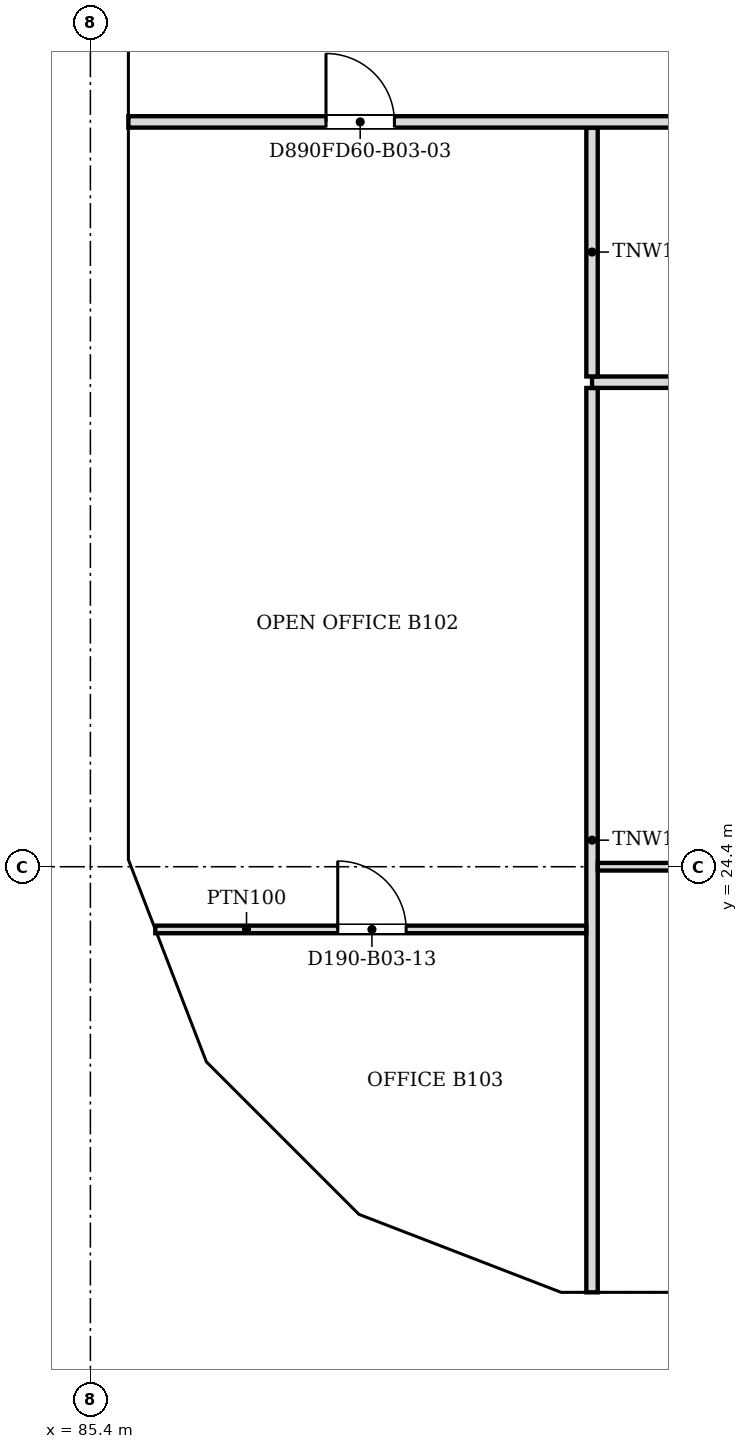
"""IFC4 building model, lengths in metres.
Left out: names, types, materials, properties, quantities, classifications, styles, units other than length and angle.
Written with IfcOpenShell. Run it as: python <this file> out.ifc"""

import sys

from ifc_helpers import new_model, si_unit, direction, frame, frame_2d, origin, place, context, subcontext, project, spatial, polyline, rectangle, outline, extrude, faceted_brep, source, transform, mapped, element, fill, save


model = new_model("IFC4")
c1 = context("Model", 3, precision=1e-05, world=origin(), true_north=direction((0.0, 1.0)))
c2 = subcontext(c1, "Body", "Model", "MODEL_VIEW")
j1 = project(units=[si_unit("LENGTHUNIT", "METRE"), si_unit("PLANEANGLEUNIT", "RADIAN")], contexts=[c1])
p1 = place(None, origin())
s1 = spatial("IfcSite", under=j1, at=p1, CompositionType="ELEMENT")
p2 = place(p1, origin())
s2 = spatial("IfcBuilding", under=s1, at=p2, CompositionType="ELEMENT")
p3 = place(p2, frame((0.0, 0.0, 25.8)))
s3 = spatial("IfcBuildingStorey", under=s2, at=p3, CompositionType="ELEMENT", Elevation=25.8)
m1 = source(origin(), c2, "Body", "Brep", [
    faceted_brep([(3.05, -0.25, 0.0), (0.047, -0.25, 3.8), (0.0, -0.25, 3.74), (0.0, -0.25, 0.0), (0.093, 0.25, 3.741), (3.05, 0.25, 0.0), (0.093, 0.25, 0.0), (0.047, 0.0, 3.8)], [[[0, 1, 2, 3]], [[4, 5, 6]], [[5, 4, 7, 1, 0]], [[2, 1, 7]], [[6, 5, 0, 3]], [[6, 3, 2, 7, 4]]]),
])
p4 = place(p3, frame((91.5, 18.55, 0.0), z_axis=(0.0, 0.0, 1.0), x_axis=(1.0, 0.0, 0.0)))
e1 = element("IfcWall", 1, at=p4, inside=s3, PredefinedType="SOLIDWALL", context=c2, shape_type="MappedRepresentation", body=[
    mapped(m1, transform((0.0, 0.0, 0.0), scale=1.0)),
])
m2 = source(origin(), c2, "Body", "SweptSolid", [
    extrude(outline(polyline([(2.534, 0.25), (0.247, 3.144), (0.247, 0.25), (2.534, 0.25)])), frame((0.0, 0.26, 0.0), z_axis=(0.0, -1.0, 0.0), x_axis=(1.0, 0.0, 0.0)), (0.0, 0.0, 1.0), 0.52),
])
p5 = place(p4, origin())
e2 = element("IfcOpeningElement", 2, at=p5, cuts=e1, PredefinedType="OPENING", context=c2, shape_type="MappedRepresentation", body=[
    mapped(m2, transform((0.0, 0.0, 0.0), scale=1.0)),
])
m3 = source(origin(), c2, "Body", "Brep", [
    faceted_brep([(2.997, -0.25, 3.741), (2.95, -0.25, 3.8), (0.0, -0.25, 0.0), (2.997, -0.25, 0.0), (0.053, 0.25, 0.068), (2.904, 0.25, 3.74), (2.904, 0.25, 0.0), (0.053, 0.25, 0.0), (2.95, 0.0, 3.8), (0.0, 0.0, 0.0)], [[[0, 1, 2, 3]], [[4, 5, 6, 7]], [[8, 1, 0]], [[5, 4, 9, 2, 1, 8]], [[7, 6, 3, 2, 9]], [[7, 9, 4]], [[3, 6, 5, 8, 0]]]),
])
p6 = place(p3, frame((88.794, 19.612, 0.0), z_axis=(0.0, 0.0, 1.0), x_axis=(0.933000876937, -0.359874094142, 0.0)))
e3 = element("IfcWall", 3, at=p6, inside=s3, PredefinedType="SOLIDWALL", context=c2, shape_type="MappedRepresentation", body=[
    mapped(m3, transform((0.0, 0.0, 0.0), scale=1.0)),
])
m4 = source(origin(), c2, "Body", "SweptSolid", [
    extrude(outline(polyline([(2.75, 3.135), (0.511, 0.25), (2.75, 0.25), (2.75, 3.135)])), frame((0.0, 0.26, 0.0), z_axis=(0.0, -1.0, 0.0), x_axis=(1.0, 0.0, 0.0)), (0.0, 0.0, 1.0), 0.52),
])
p7 = place(p6, origin())
e4 = element("IfcOpeningElement", 4, at=p7, cuts=e3, PredefinedType="OPENING", context=c2, shape_type="MappedRepresentation", body=[
    mapped(m4, transform((0.0, 0.0, 0.0), scale=1.0)),
])
m5 = source(origin(), c2, "Body", "SweptSolid", [
    extrude(outline(polyline([(6.1, 0.0), (3.05, 3.8), (0.0, 0.0), (6.1, 0.0)])), frame((0.0, 0.25, 0.0), z_axis=(0.0, -1.0, 0.0), x_axis=(1.0, 0.0, 0.0)), (0.0, 0.0, 1.0), 0.5),
])
p8 = place(p3, frame((85.65, 36.6, 0.0), z_axis=(0.0, 0.0, 1.0), x_axis=(0.0, -1.0, 0.0)))
e5 = element("IfcWall", 5, at=p8, inside=s3, PredefinedType="SOLIDWALL", context=c2, shape_type="MappedRepresentation", body=[
    mapped(m5, transform((0.0, 0.0, 0.0), scale=1.0)),
])
m6 = source(origin(), c2, "Body", "SweptSolid", [
    extrude(outline(polyline([(5.579, 0.25), (3.05, 3.401), (0.521, 0.25), (5.579, 0.25)])), frame((0.0, 0.26, 0.0), z_axis=(0.0, -1.0, 0.0), x_axis=(1.0, 0.0, 0.0)), (0.0, 0.0, 1.0), 0.52),
])
p9 = place(p8, origin())
e6 = element("IfcOpeningElement", 6, at=p9, cuts=e5, PredefinedType="OPENING", context=c2, shape_type="MappedRepresentation", body=[
    mapped(m6, transform((0.0, 0.0, 0.0), scale=1.0)),
])
m7 = source(origin(), c2, "Body", "Brep", [
    faceted_brep([(6.053, -0.25, 0.0), (3.05, -0.25, 3.8), (0.0, -0.25, 0.0), (0.0, 0.25, 0.0), (3.05, 0.25, 3.8), (6.007, 0.25, 0.059), (6.007, 0.25, 0.0), (6.053, 0.0, 0.0)], [[[0, 1, 2]], [[3, 4, 5, 6]], [[5, 4, 1, 0, 7]], [[4, 3, 2, 1]], [[3, 6, 7, 0, 2]], [[7, 6, 5]]]),
])
p10 = place(p3, frame((85.65, 30.5, 0.0), z_axis=(0.0, 0.0, 1.0), x_axis=(0.0, -1.0, 0.0)))
e7 = element("IfcWall", 7, at=p10, inside=s3, PredefinedType="SOLIDWALL", context=c2, shape_type="MappedRepresentation", body=[
    mapped(m7, transform((0.0, 0.0, 0.0), scale=1.0)),
])
m8 = source(origin(), c2, "Body", "SweptSolid", [
    extrude(outline(polyline([(5.537, 0.25), (3.049, 3.399), (0.521, 0.25), (5.537, 0.25)])), frame((0.0, 0.26, 0.0), z_axis=(0.0, -1.0, 0.0), x_axis=(1.0, 0.0, 0.0)), (0.0, 0.0, 1.0), 0.52),
])
p11 = place(p10, origin())
e8 = element("IfcOpeningElement", 8, at=p11, cuts=e7, PredefinedType="OPENING", context=c2, shape_type="MappedRepresentation", body=[
    mapped(m8, transform((0.0, 0.0, 0.0), scale=1.0)),
])
m9 = source(origin(), c2, "Body", "Brep", [
    faceted_brep([(3.003, -0.25, 3.732), (2.95, -0.25, 3.8), (0.0, -0.25, 0.0), (3.003, -0.25, 0.0), (0.047, 0.25, 0.06), (2.898, 0.25, 3.732), (2.898, 0.25, 0.0), (0.047, 0.25, 0.0), (2.95, 0.0, 3.8), (0.0, 0.0, 0.0)], [[[0, 1, 2, 3]], [[4, 5, 6, 7]], [[8, 1, 0]], [[5, 4, 9, 2, 1, 8]], [[7, 6, 3, 2, 9]], [[7, 9, 4]], [[3, 6, 5, 8, 0]]]),
])
p12 = place(p3, frame((85.65, 24.447, 0.0), z_axis=(0.0, 0.0, 1.0), x_axis=(0.35992665181, -0.932980602862, 0.0)))
e9 = element("IfcWall", 9, at=p12, inside=s3, PredefinedType="SOLIDWALL", context=c2, shape_type="MappedRepresentation", body=[
    mapped(m9, transform((0.0, 0.0, 0.0), scale=1.0)),
])
p13 = place(p12, origin())
e10 = element("IfcOpeningElement", 10, at=p13, cuts=e9, PredefinedType="OPENING", context=c2, shape_type="MappedRepresentation", body=[
    mapped(m4, transform((0.0, 0.0, 0.0), scale=1.0)),
])
m10 = source(origin(), c2, "Body", "Brep", [
    faceted_brep([(2.997, -0.25, 0.0), (0.053, -0.25, 3.8), (0.0, -0.25, 3.732), (0.0, -0.25, 0.0), (0.106, 0.25, 3.732), (2.944, 0.25, 0.068), (2.944, 0.25, 0.0), (0.106, 0.25, 0.0), (0.053, 0.0, 3.8), (2.997, 0.0, 0.0)], [[[0, 1, 2, 3]], [[4, 5, 6, 7]], [[5, 4, 8, 1, 0, 9]], [[2, 1, 8]], [[7, 6, 9, 0, 3]], [[7, 3, 2, 8, 4]], [[9, 6, 5]]]),
])
p14 = place(p3, frame((86.675, 21.731, 0.0), z_axis=(0.0, 0.0, 1.0), x_axis=(0.707106781187, -0.707106781187, 0.0)))
e11 = element("IfcWall", 11, at=p14, inside=s3, PredefinedType="SOLIDWALL", context=c2, shape_type="MappedRepresentation", body=[
    mapped(m10, transform((0.0, 0.0, 0.0), scale=1.0)),
])
m11 = source(origin(), c2, "Body", "SweptSolid", [
    extrude(outline(polyline([(2.487, 0.25), (0.253, 3.134), (0.253, 0.25), (2.487, 0.25)])), frame((0.0, 0.26, 0.0), z_axis=(0.0, -1.0, 0.0), x_axis=(1.0, 0.0, 0.0)), (0.0, 0.0, 1.0), 0.52),
])
p15 = place(p14, origin())
e12 = element("IfcOpeningElement", 12, at=p15, cuts=e11, PredefinedType="OPENING", context=c2, shape_type="MappedRepresentation", body=[
    mapped(m11, transform((0.0, 0.0, 0.0), scale=1.0)),
])
p16 = place(p2, frame((0.0, 0.0, 29.6)))
s4 = spatial("IfcBuildingStorey", under=s2, at=p16, CompositionType="ELEMENT", Elevation=29.6)
m12 = source(origin(), c2, "Body", "Brep", [
    faceted_brep([(3.003, -0.25, 0.0), (6.053, -0.25, 3.8), (3.003, -0.25, 7.6), (0.0, -0.25, 3.8), (0.047, 0.25, 3.859), (3.003, 0.25, 7.6), (6.053, 0.25, 3.8), (3.003, 0.25, 0.0), (0.047, 0.25, 3.741), (0.0, 0.0, 3.8)], [[[0, 1, 2, 3]], [[4, 5, 6, 7, 8]], [[7, 6, 1, 0]], [[6, 5, 2, 1]], [[5, 4, 9, 3, 2]], [[8, 7, 0, 3, 9]], [[8, 9, 4]]]),
])
p17 = place(p16, frame((91.547, 18.55, -3.8), z_axis=(0.0, 0.0, 1.0), x_axis=(1.0, 0.0, 0.0)))
e13 = element("IfcWall", 13, at=p17, inside=s4, PredefinedType="SOLIDWALL", context=c2, shape_type="MappedRepresentation", body=[
    mapped(m12, transform((0.0, 0.0, 0.0), scale=1.0)),
])
m13 = source(origin(), c2, "Body", "SweptSolid", [
    extrude(outline(polyline([(3.005, 0.401), (5.733, 3.8), (3.005, 7.199), (0.319, 3.8), (3.005, 0.401)])), frame((0.0, 0.26, 0.0), z_axis=(0.0, -1.0, 0.0), x_axis=(1.0, 0.0, 0.0)), (0.0, 0.0, 1.0), 0.52),
])
p18 = place(p17, origin())
e14 = element("IfcOpeningElement", 14, at=p18, cuts=e13, PredefinedType="OPENING", context=c2, shape_type="MappedRepresentation", body=[
    mapped(m13, transform((0.0, 0.0, 0.0), scale=1.0)),
])
m14 = source(origin(), c2, "Body", "Brep", [
    faceted_brep([(3.05, -0.25, 0.0), (6.1, -0.25, 3.8), (6.1, -0.25, 3.8), (3.05, -0.25, 7.6), (0.0, -0.25, 3.8), (0.0, 0.25, 3.8), (3.05, 0.25, 7.6), (6.1, 0.25, 3.8), (6.1, 0.25, 3.8), (3.05, 0.25, 0.0)], [[[0, 1, 2, 3, 4]], [[5, 6, 7, 8, 9]], [[9, 8, 1, 0]], [[7, 6, 3, 2]], [[6, 5, 4, 3]], [[5, 9, 0, 4]], [[1, 8, 7, 2]]]),
])
p19 = place(p16, frame((85.65, 39.65, -3.8), z_axis=(0.0, 0.0, 1.0), x_axis=(0.0, -1.0, 0.0)))
e15 = element("IfcWall", 15, at=p19, inside=s4, PredefinedType="SOLIDWALL", context=c2, shape_type="MappedRepresentation", body=[
    mapped(m14, transform((0.0, 0.0, 0.0), scale=1.0)),
])
m15 = source(origin(), c2, "Body", "SweptSolid", [
    extrude(outline(polyline([(3.05, 0.399), (5.78, 3.8), (3.05, 7.2), (0.321, 3.8), (3.05, 0.399)])), frame((0.0, 0.26, 0.0), z_axis=(0.0, -1.0, 0.0), x_axis=(1.0, 0.0, 0.0)), (0.0, 0.0, 1.0), 0.52),
])
p20 = place(p19, origin())
e16 = element("IfcOpeningElement", 16, at=p20, cuts=e15, PredefinedType="OPENING", context=c2, shape_type="MappedRepresentation", body=[
    mapped(m15, transform((0.0, 0.0, 0.0), scale=1.0)),
])
m16 = source(origin(), c2, "Body", "SweptSolid", [
    extrude(outline(polyline([(3.05, 0.0), (6.1, 3.8), (3.05, 7.6), (0.0, 3.8), (3.05, 0.0)])), frame((0.0, 0.25, 0.0), z_axis=(0.0, -1.0, 0.0), x_axis=(1.0, 0.0, 0.0)), (0.0, 0.0, 1.0), 0.5),
])
p21 = place(p16, frame((85.65, 33.55, -3.8), z_axis=(0.0, 0.0, 1.0), x_axis=(0.0, -1.0, 0.0)))
e17 = element("IfcWall", 17, at=p21, inside=s4, PredefinedType="SOLIDWALL", context=c2, shape_type="MappedRepresentation", body=[
    mapped(m16, transform((0.0, 0.0, 0.0), scale=1.0)),
])
p22 = place(p21, origin())
e18 = element("IfcOpeningElement", 18, at=p22, cuts=e17, PredefinedType="OPENING", context=c2, shape_type="MappedRepresentation", body=[
    mapped(m15, transform((0.0, 0.0, 0.0), scale=1.0)),
])
m17 = source(origin(), c2, "Body", "Brep", [
    faceted_brep([(3.003, -0.25, 0.0), (3.05, -0.25, 0.06), (3.05, -0.25, 7.54), (3.003, -0.25, 7.6), (0.0, -0.25, 3.8), (0.0, 0.25, 3.8), (2.957, 0.25, 7.541), (2.957, 0.25, 0.059), (3.003, 0.0, 0.0), (3.003, 0.0, 7.6)], [[[0, 1, 2, 3, 4]], [[5, 6, 7]], [[1, 0, 8]], [[9, 3, 2]], [[6, 5, 4, 3, 9]], [[5, 7, 8, 0, 4]], [[1, 8, 7, 6, 9, 2]]]),
])
p23 = place(p16, frame((85.65, 27.45, -3.8), z_axis=(0.0, 0.0, 1.0), x_axis=(0.0, -1.0, 0.0)))
e19 = element("IfcWall", 19, at=p23, inside=s4, PredefinedType="SOLIDWALL", context=c2, shape_type="MappedRepresentation", body=[
    mapped(m17, transform((0.0, 0.0, 0.0), scale=1.0)),
])
m18 = source(origin(), c2, "Body", "SweptSolid", [
    extrude(outline(polyline([(2.803, 6.944), (0.319, 3.8), (2.803, 0.656), (2.803, 6.944)])), frame((0.0, 0.26, 0.0), z_axis=(0.0, -1.0, 0.0), x_axis=(1.0, 0.0, 0.0)), (0.0, 0.0, 1.0), 0.52),
])
p24 = place(p23, origin())
e20 = element("IfcOpeningElement", 20, at=p24, cuts=e19, PredefinedType="OPENING", context=c2, shape_type="MappedRepresentation", body=[
    mapped(m18, transform((0.0, 0.0, 0.0), scale=1.0)),
])
m19 = source(origin(), c2, "Body", "Brep", [
    faceted_brep([(0.047, -0.25, 0.0), (2.997, -0.25, 3.8), (0.047, -0.25, 7.6), (0.0, -0.25, 7.541), (0.0, -0.25, 0.059), (0.093, 0.25, 7.54), (2.944, 0.25, 3.868), (2.944, 0.25, 3.732), (0.093, 0.25, 0.06), (2.997, 0.0, 3.8), (0.047, 0.0, 0.0), (0.047, 0.0, 7.6)], [[[0, 1, 2, 3, 4]], [[5, 6, 7, 8]], [[8, 7, 9, 1, 0, 10]], [[6, 5, 11, 2, 1, 9]], [[3, 2, 11]], [[10, 0, 4]], [[8, 10, 4, 3, 11, 5]], [[7, 6, 9]]]),
])
p25 = place(p16, frame((85.633, 24.49, -3.8), z_axis=(0.0, 0.0, 1.0), x_axis=(0.359901446078, -0.932990326376, 0.0)))
e21 = element("IfcWall", 21, at=p25, inside=s4, PredefinedType="SOLIDWALL", context=c2, shape_type="MappedRepresentation", body=[
    mapped(m19, transform((0.0, 0.0, 0.0), scale=1.0)),
])
m20 = source(origin(), c2, "Body", "SweptSolid", [
    extrude(outline(polyline([(0.247, 0.665), (2.681, 3.8), (0.247, 6.935), (0.247, 0.665)])), frame((0.0, 0.26, 0.0), z_axis=(0.0, -1.0, 0.0), x_axis=(1.0, 0.0, 0.0)), (0.0, 0.0, 1.0), 0.52),
])
p26 = place(p25, origin())
e22 = element("IfcOpeningElement", 22, at=p26, cuts=e21, PredefinedType="OPENING", context=c2, shape_type="MappedRepresentation", body=[
    mapped(m20, transform((0.0, 0.0, 0.0), scale=1.0)),
])
m21 = source(origin(), c2, "Body", "Brep", [
    faceted_brep([(2.944, -0.25, 0.0), (2.997, -0.25, 0.068), (2.997, -0.25, 7.532), (2.944, -0.25, 7.6), (0.0, -0.25, 3.8), (0.053, 0.25, 3.868), (2.891, 0.25, 7.532), (2.891, 0.25, 0.068), (0.053, 0.25, 3.732), (2.944, 0.0, 0.0), (2.944, 0.0, 7.6), (0.0, 0.0, 3.8)], [[[0, 1, 2, 3, 4]], [[5, 6, 7, 8]], [[1, 0, 9]], [[10, 3, 2]], [[6, 5, 11, 4, 3, 10]], [[8, 7, 9, 0, 4, 11]], [[8, 11, 5]], [[1, 9, 7, 6, 10, 2]]]),
])
p27 = place(p16, frame((86.712, 21.694, -3.8), z_axis=(0.0, 0.0, 1.0), x_axis=(0.707066050402, -0.707147509625, 0.0)))
e23 = element("IfcWall", 23, at=p27, inside=s4, PredefinedType="SOLIDWALL", context=c2, shape_type="MappedRepresentation", body=[
    mapped(m21, transform((0.0, 0.0, 0.0), scale=1.0)),
])
m22 = source(origin(), c2, "Body", "SweptSolid", [
    extrude(outline(polyline([(2.744, 6.934), (0.316, 3.8), (2.744, 0.666), (2.744, 6.934)])), frame((0.0, 0.26, 0.0), z_axis=(0.0, -1.0, 0.0), x_axis=(1.0, 0.0, 0.0)), (0.0, 0.0, 1.0), 0.52),
])
p28 = place(p27, origin())
e24 = element("IfcOpeningElement", 24, at=p28, cuts=e23, PredefinedType="OPENING", context=c2, shape_type="MappedRepresentation", body=[
    mapped(m22, transform((0.0, 0.0, 0.0), scale=1.0)),
])
m23 = source(origin(), c2, "Body", "Brep", [
    faceted_brep([(0.053, -0.25, 0.0), (3.003, -0.25, 3.8), (0.053, -0.25, 7.6), (0.0, -0.25, 7.531), (0.0, -0.25, 0.068), (0.106, 0.25, 7.532), (2.957, 0.25, 3.86), (2.957, 0.25, 3.74), (0.106, 0.25, 0.068), (3.003, 0.0, 3.8), (0.053, 0.0, 0.0), (0.053, 0.0, 7.6)], [[[0, 1, 2, 3, 4]], [[5, 6, 7, 8]], [[8, 7, 9, 1, 0, 10]], [[6, 5, 11, 2, 1, 9]], [[3, 2, 11]], [[10, 0, 4]], [[8, 10, 4, 3, 11, 5]], [[7, 6, 9]]]),
])
p29 = place(p16, frame((88.744, 19.631, -3.8), z_axis=(0.0, 0.0, 1.0), x_axis=(0.932997369089, -0.359883188373, 0.0)))
e25 = element("IfcWall", 25, at=p29, inside=s4, PredefinedType="SOLIDWALL", context=c2, shape_type="MappedRepresentation", body=[
    mapped(m23, transform((0.0, 0.0, 0.0), scale=1.0)),
])
m24 = source(origin(), c2, "Body", "SweptSolid", [
    extrude(outline(polyline([(0.253, 0.665), (2.687, 3.8), (0.253, 6.935), (0.253, 0.665)])), frame((0.0, 0.26, 0.0), z_axis=(0.0, -1.0, 0.0), x_axis=(1.0, 0.0, 0.0)), (0.0, 0.0, 1.0), 0.52),
])
p30 = place(p29, origin())
e26 = element("IfcOpeningElement", 26, at=p30, cuts=e25, PredefinedType="OPENING", context=c2, shape_type="MappedRepresentation", body=[
    mapped(m24, transform((0.0, 0.0, 0.0), scale=1.0)),
])
p31 = place(p3, frame((92.0, 18.8, 0.0), z_axis=(0.0, 0.0, 1.0), x_axis=(0.0, 1.0, 0.0)))
e27 = element("IfcWall", 27, at=p31, inside=s3, PredefinedType="PARTITIONING", context=c2, shape_type="SweptSolid", body=[
    extrude(rectangle(XDim=11.899, YDim=0.15, at=frame_2d((5.949, 0.0))), origin(), (0.0, 0.0, 1.0), 3.067),
])
p32 = place(p3, frame((91.924, 23.575, 0.0), z_axis=(0.0, 0.0, 1.0), x_axis=(-1.0, 0.0, 0.0)))
e28 = element("IfcWall", 28, at=p32, inside=s3, PredefinedType="PARTITIONING", context=c2, shape_type="SweptSolid", body=[
    extrude(rectangle(XDim=5.67, YDim=0.1, at=frame_2d((2.835, 0.0))), origin(), (0.0, 0.0, 1.0), 3.067),
])
m25 = source(origin(), c2, "Body", "SweptSolid", [
    extrude(rectangle(XDim=0.9, YDim=2.1, at=frame_2d((0.45, 1.05))), frame((0.0, 0.06, 0.0), z_axis=(0.0, -1.0, 0.0), x_axis=(1.0, 0.0, 0.0)), (0.0, 0.0, 1.0), 0.12),
])
p33 = place(p32, frame((2.37, 0.0, 0.0)))
e29 = element("IfcOpeningElement", 29, at=p33, cuts=e28, PredefinedType="OPENING", context=c2, shape_type="MappedRepresentation", body=[
    mapped(m25, transform((0.0, 0.0, 0.0), scale=1.0)),
])
p34 = place(p3, frame((97.149, 24.4, 0.0), z_axis=(0.0, 0.0, 1.0), x_axis=(-1.0, 0.0, 0.0)))
e30 = element("IfcWall", 30, at=p34, inside=s3, PredefinedType="PARTITIONING", context=c2, shape_type="SweptSolid", body=[
    extrude(rectangle(XDim=5.073, YDim=0.1, at=frame_2d((2.537, 0.0))), origin(), (0.0, 0.0, 1.0), 3.067),
])
p35 = place(p34, frame((2.073, 0.0, 0.0)))
e31 = element("IfcOpeningElement", 31, at=p35, cuts=e30, PredefinedType="OPENING", context=c2, shape_type="MappedRepresentation", body=[
    mapped(m25, transform((0.0, 0.0, 0.0), scale=1.0)),
])
p36 = place(p3, frame((104.2, 30.775, 0.0), z_axis=(0.0, 0.0, 1.0), x_axis=(-1.0, 0.0, 0.0)))
e32 = element("IfcWall", 32, at=p36, inside=s3, PredefinedType="PARTITIONING", context=c2, shape_type="SweptSolid", body=[
    extrude(rectangle(XDim=12.2, YDim=0.15, at=frame_2d((6.1, 0.0))), origin(), (0.0, 0.0, 1.0), 3.067),
])
m26 = source(origin(), c2, "Body", "SweptSolid", [
    extrude(rectangle(XDim=0.9, YDim=2.1, at=frame_2d((0.45, 1.05))), frame((0.0, 0.085, 0.0), z_axis=(0.0, -1.0, 0.0), x_axis=(1.0, 0.0, 0.0)), (0.0, 0.0, 1.0), 0.17),
])
p37 = place(p36, frame((5.7, 0.0, 0.0)))
e33 = element("IfcOpeningElement", 33, at=p37, cuts=e32, PredefinedType="OPENING", context=c2, shape_type="MappedRepresentation", body=[
    mapped(m26, transform((0.0, 0.0, 0.0), scale=1.0)),
])
p38 = place(p3, frame((92.0, 30.851, 0.0), z_axis=(0.0, 0.0, 1.0), x_axis=(0.0, 1.0, 0.0)))
e34 = element("IfcWall", 34, at=p38, inside=s3, PredefinedType="PARTITIONING", context=c2, shape_type="SweptSolid", body=[
    extrude(rectangle(XDim=3.273, YDim=0.15, at=frame_2d((1.636, 0.0))), origin(), (0.0, 0.0, 1.0), 3.067),
])
p39 = place(p3, frame((133.7, 34.2, 0.0), z_axis=(0.0, 0.0, 1.0), x_axis=(-1.0, 0.0, 0.0)))
e35 = element("IfcWall", 35, at=p39, inside=s3, PredefinedType="PARTITIONING", context=c2, shape_type="SweptSolid", body=[
    extrude(rectangle(XDim=47.8, YDim=0.15, at=frame_2d((23.9, 0.0))), origin(), (0.0, 0.0, 1.0), 3.067),
])
p40 = place(p39, frame((2.099, 0.0, 0.0)))
e36 = element("IfcOpeningElement", 36, at=p40, cuts=e35, PredefinedType="OPENING", context=c2, shape_type="MappedRepresentation", body=[
    mapped(m26, transform((0.0, 0.0, 0.0), scale=1.0)),
])
m27 = source(origin(), c2, "Body", "SweptSolid", [
    extrude(rectangle(XDim=1.0, YDim=2.1, at=frame_2d((0.5, 1.05))), frame((0.0, 0.085, 0.0), z_axis=(0.0, -1.0, 0.0), x_axis=(1.0, 0.0, 0.0)), (0.0, 0.0, 1.0), 0.17),
])
p41 = place(p39, frame((26.199, 0.0, 0.0)))
e37 = element("IfcOpeningElement", 37, at=p41, cuts=e35, PredefinedType="OPENING", context=c2, shape_type="MappedRepresentation", body=[
    mapped(m27, transform((0.0, 0.0, 0.0), scale=1.0)),
])
p42 = place(p39, frame((44.3, 0.0, 0.0)))
e38 = element("IfcOpeningElement", 38, at=p42, cuts=e35, PredefinedType="OPENING", context=c2, shape_type="MappedRepresentation", body=[
    mapped(m26, transform((0.0, 0.0, 0.0), scale=1.0)),
])
p43 = place(p39, frame((9.249, 0.0, 0.0)))
e39 = element("IfcOpeningElement", 39, at=p43, cuts=e35, PredefinedType="OPENING", context=c2, shape_type="MappedRepresentation", body=[
    mapped(m26, transform((0.0, 0.0, 0.0), scale=1.0)),
])
p44 = place(p39, frame((18.6, 0.0, 0.0)))
e40 = element("IfcOpeningElement", 40, at=p44, cuts=e35, PredefinedType="OPENING", context=c2, shape_type="MappedRepresentation", body=[
    mapped(m27, transform((0.0, 0.0, 0.0), scale=1.0)),
])
p45 = place(p39, frame((35.1, 0.0, 0.0)))
e41 = element("IfcOpeningElement", 41, at=p45, cuts=e35, PredefinedType="OPENING", context=c2, shape_type="MappedRepresentation", body=[
    mapped(m27, transform((0.0, 0.0, 0.0), scale=1.0)),
])
m28 = source(origin(), c2, "Body", "SweptSolid", [
    extrude(rectangle(XDim=0.9, YDim=2.1, at=frame_2d((0.45, 1.05))), frame((0.0, 0.025, 0.0), z_axis=(0.0, -1.0, 0.0), x_axis=(1.0, 0.0, 0.0)), (0.0, 0.0, 1.0), 0.05),
])
p46 = place(p33, origin())
e42 = element("IfcDoor", 42, at=p46, inside=s3, OperationType="SINGLE_SWING_RIGHT", PredefinedType="DOOR", context=c2, shape_type="MappedRepresentation", body=[
    mapped(m28, transform((0.0, 0.0, 0.0), scale=1.0)),
])
fill(e29, e42)
p47 = place(p42, origin())
e43 = element("IfcDoor", 43, at=p47, inside=s3, OperationType="SINGLE_SWING_RIGHT", PredefinedType="DOOR", context=c2, shape_type="MappedRepresentation", body=[
    mapped(m28, transform((0.0, 0.0, 0.0), scale=1.0)),
])
fill(e38, e43)
save(model, sys.argv[1])
